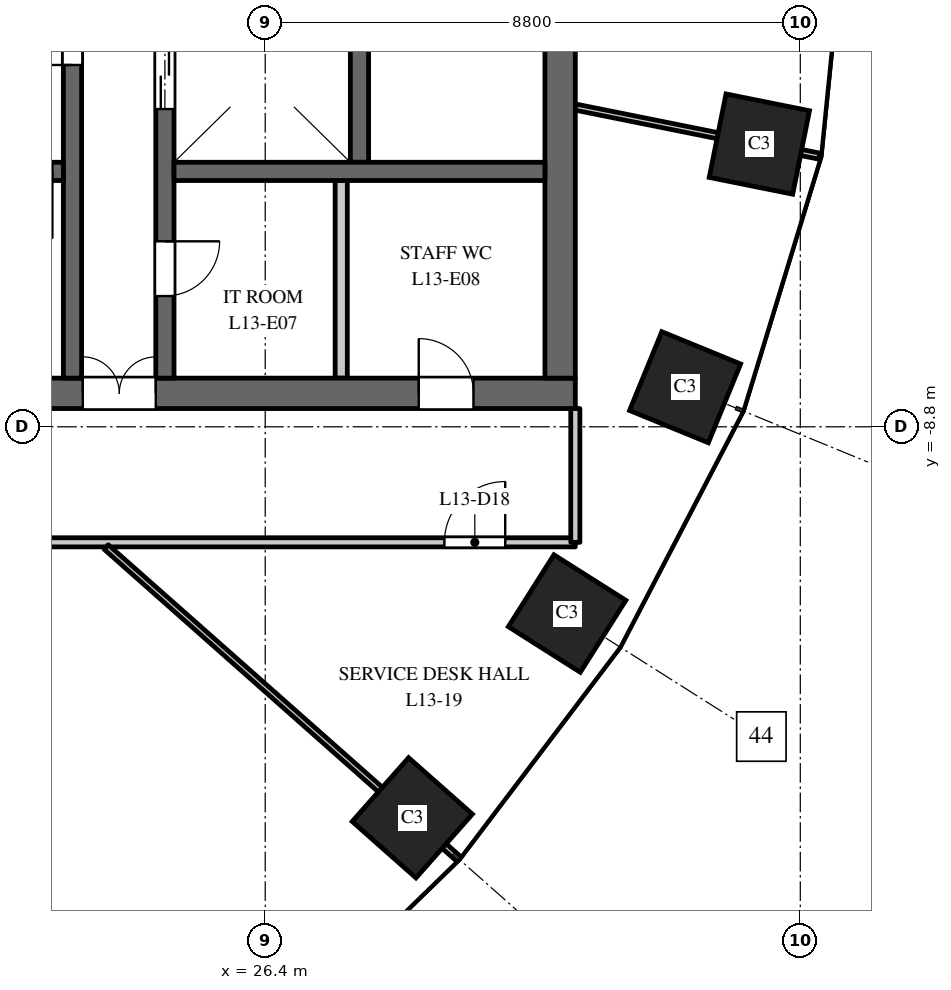
"""IFC4 building model, lengths in metres.
Left out: names, types, materials, properties, quantities, classifications, styles, units other than length and angle.
Written with IfcOpenShell. Run it as: python <this file> out.ifc"""

import sys

from ifc_helpers import new_model, si_unit, direction, frame, frame_2d, origin, origin_2d, place, context, subcontext, project, spatial, rectangle, extrude, element, fill, save


model = new_model("IFC4")
c1 = context("Model", 3, precision=1e-05, world=origin(), true_north=direction((0.0, 1.0)))
c2 = subcontext(c1, "Body", "Model", "MODEL_VIEW")
j1 = project(units=[si_unit("LENGTHUNIT", "METRE"), si_unit("PLANEANGLEUNIT", "RADIAN")], contexts=[c1])
p1 = place(None, origin())
s1 = spatial("IfcSite", under=j1, at=p1, CompositionType="ELEMENT")
p2 = place(p1, origin())
s2 = spatial("IfcBuilding", under=s1, at=p2, CompositionType="ELEMENT")
p3 = place(p2, frame((0.0, 0.0, 62.5)))
s3 = spatial("IfcBuildingStorey", under=s2, at=p3, CompositionType="ELEMENT", Elevation=62.5)
for number, where, z_axis, x_axis in (
    (1, (28.819, -15.23, 0.0), (0.0, 0.0, 1.0), (0.663, 0.749, 0.0)),
    (2, (31.365, -11.871, 0.0), (0.0, 0.0, 1.0), (0.535, 0.845, 0.0)),
    (3, (33.305, -8.149, 0.0), (0.0, 0.0, 1.0), (0.379, 0.925, 0.0)),
    (4, (34.527, -4.151, 0.0), (0.0, 0.0, 1.0), (0.197, 0.98, 0.0)),
):
    element("IfcColumn", number, at=place(p3, frame(where, z_axis=z_axis, x_axis=x_axis)), inside=s3, PredefinedType="COLUMN", context=c2, shape_type="SweptSolid", body=[
        extrude(rectangle(XDim=1.4, YDim=1.4, at=origin_2d()), origin(), (0.0, 0.0, 1.0), 4.0),
    ])
p4 = place(p3, frame((16.5, -8.25, 0.0), z_axis=(0.0, 0.0, 1.0), x_axis=(1.0, 0.0, 0.0)))
e5 = element("IfcWall", 5, at=p4, inside=s3, PredefinedType="SHEAR", context=c2, shape_type="SweptSolid", body=[
    extrude(rectangle(XDim=15.0, YDim=0.5, at=frame_2d((7.5, 0.0))), origin(), (0.0, 0.0, 1.0), 3.7),
])
p5 = place(p4, frame((6.9, 0.0, 0.0)))
e6 = element("IfcOpeningElement", 6, at=p5, cuts=e5, PredefinedType="OPENING", context=c2, shape_type="SweptSolid", body=[
    extrude(rectangle(XDim=1.2, YDim=2.1, at=frame_2d((0.6, 1.05))), frame((0.0, 0.26, 0.0), z_axis=(0.0, -1.0, 0.0), x_axis=(1.0, 0.0, 0.0)), (0.0, 0.0, 1.0), 0.52),
])
p6 = place(p4, frame((12.425, 0.0, 0.0)))
e7 = element("IfcOpeningElement", 7, at=p6, cuts=e5, PredefinedType="OPENING", context=c2, shape_type="SweptSolid", body=[
    extrude(rectangle(XDim=0.9, YDim=2.1, at=frame_2d((0.45, 1.05))), frame((0.0, 0.26, 0.0), z_axis=(0.0, -1.0, 0.0), x_axis=(1.0, 0.0, 0.0)), (0.0, 0.0, 1.0), 0.52),
])
p7 = place(p3, frame((27.95, -4.45, 0.0), z_axis=(0.0, 0.0, 1.0), x_axis=(0.0, 1.0, 0.0)))
e8 = element("IfcWall", 8, at=p7, inside=s3, PredefinedType="SHEAR", context=c2, shape_type="SweptSolid", body=[
    extrude(rectangle(XDim=8.9, YDim=0.3, at=frame_2d((4.45, 0.0))), origin(), (0.0, 0.0, 1.0), 3.7),
])
p8 = place(p3, frame((24.75, -8.0, 0.0), z_axis=(0.0, 0.0, 1.0), x_axis=(0.0, 1.0, 0.0)))
e9 = element("IfcWall", 9, at=p8, inside=s3, PredefinedType="SHEAR", context=c2, shape_type="SweptSolid", body=[
    extrude(rectangle(XDim=16.0, YDim=0.3, at=frame_2d((8.0, 0.0))), origin(), (0.0, 0.0, 1.0), 3.7),
])
p9 = place(p8, frame((4.425, 0.0, 0.0)))
e10 = element("IfcOpeningElement", 10, at=p9, cuts=e9, PredefinedType="OPENING", context=c2, shape_type="SweptSolid", body=[
    extrude(rectangle(XDim=1.1, YDim=2.1, at=frame_2d((0.55, 1.05))), frame((0.0, 0.16, 0.0), z_axis=(0.0, -1.0, 0.0), x_axis=(1.0, 0.0, 0.0)), (0.0, 0.0, 1.0), 0.32),
])
p10 = place(p8, frame((7.45, 0.0, 0.0)))
e11 = element("IfcOpeningElement", 11, at=p10, cuts=e9, PredefinedType="OPENING", context=c2, shape_type="SweptSolid", body=[
    extrude(rectangle(XDim=1.1, YDim=2.1, at=frame_2d((0.55, 1.05))), frame((0.0, 0.16, 0.0), z_axis=(0.0, -1.0, 0.0), x_axis=(1.0, 0.0, 0.0)), (0.0, 0.0, 1.0), 0.32),
])
p11 = place(p8, frame((10.425, 0.0, 0.0)))
e12 = element("IfcOpeningElement", 12, at=p11, cuts=e9, PredefinedType="OPENING", context=c2, shape_type="SweptSolid", body=[
    extrude(rectangle(XDim=1.2, YDim=2.1, at=frame_2d((0.6, 1.05))), frame((0.0, 0.16, 0.0), z_axis=(0.0, -1.0, 0.0), x_axis=(1.0, 0.0, 0.0)), (0.0, 0.0, 1.0), 0.32),
])
p12 = place(p8, frame((13.75, 0.0, 0.0)))
e13 = element("IfcOpeningElement", 13, at=p12, cuts=e9, PredefinedType="OPENING", context=c2, shape_type="SweptSolid", body=[
    extrude(rectangle(XDim=0.9, YDim=2.1, at=frame_2d((0.45, 1.05))), frame((0.0, 0.16, 0.0), z_axis=(0.0, -1.0, 0.0), x_axis=(1.0, 0.0, 0.0)), (0.0, 0.0, 1.0), 0.32),
])
p13 = place(p8, frame((1.35, 0.0, 0.0)))
e14 = element("IfcOpeningElement", 14, at=p13, cuts=e9, PredefinedType="OPENING", context=c2, shape_type="SweptSolid", body=[
    extrude(rectangle(XDim=0.9, YDim=2.1, at=frame_2d((0.45, 1.05))), frame((0.0, 0.16, 0.0), z_axis=(0.0, -1.0, 0.0), x_axis=(1.0, 0.0, 0.0)), (0.0, 0.0, 1.0), 0.32),
])
p14 = place(p3, frame((31.25, -8.0, 0.0), z_axis=(0.0, 0.0, 1.0), x_axis=(0.0, 1.0, 0.0)))
e15 = element("IfcWall", 15, at=p14, inside=s3, PredefinedType="SHEAR", context=c2, shape_type="SweptSolid", body=[
    extrude(rectangle(XDim=16.0, YDim=0.5, at=frame_2d((8.0, 0.0))), origin(), (0.0, 0.0, 1.0), 3.7),
])
p15 = place(p3, frame((27.65, -8.0, 0.0), z_axis=(0.0, 0.0, 1.0), x_axis=(0.0, 1.0, 0.0)))
e16 = element("IfcWall", 16, at=p15, inside=s3, PredefinedType="PARTITIONING", context=c2, shape_type="SweptSolid", body=[
    extrude(rectangle(XDim=3.25, YDim=0.2, at=frame_2d((1.625, 0.0))), origin(), (0.0, 0.0, 1.0), 3.7),
])
p16 = place(p3, frame((24.9, -4.6, 0.0), z_axis=(0.0, 0.0, 1.0), x_axis=(1.0, 0.0, 0.0)))
e17 = element("IfcWall", 17, at=p16, inside=s3, PredefinedType="SHEAR", context=c2, shape_type="SweptSolid", body=[
    extrude(rectangle(XDim=6.1, YDim=0.3, at=frame_2d((3.05, 0.0))), origin(), (0.0, 0.0, 1.0), 3.7),
])
p17 = place(p3, frame((23.23, -8.0, 0.0), z_axis=(0.0, 0.0, 1.0), x_axis=(0.0, 1.0, 0.0)))
e18 = element("IfcWall", 18, at=p17, inside=s3, PredefinedType="SHEAR", context=c2, shape_type="SweptSolid", body=[
    extrude(rectangle(XDim=7.875, YDim=0.3, at=frame_2d((3.938, 0.0))), origin(), (0.0, 0.0, 1.0), 3.7),
])
p18 = place(p17, frame((5.15, 0.0, 0.0)))
e19 = element("IfcOpeningElement", 19, at=p18, cuts=e18, PredefinedType="OPENING", context=c2, shape_type="SweptSolid", body=[
    extrude(rectangle(XDim=1.1, YDim=2.1, at=frame_2d((0.55, 1.05))), frame((0.0, 0.16, 0.0), z_axis=(0.0, -1.0, 0.0), x_axis=(1.0, 0.0, 0.0)), (0.0, 0.0, 1.0), 0.32),
])
p19 = place(p3, frame((16.9, -4.6, 0.0), z_axis=(0.0, 0.0, 1.0), x_axis=(1.0, 0.0, 0.0)))
e20 = element("IfcWall", 20, at=p19, inside=s3, PredefinedType="SHEAR", context=c2, shape_type="SweptSolid", body=[
    extrude(rectangle(XDim=6.18, YDim=0.3, at=frame_2d((3.09, 0.0))), origin(), (0.0, 0.0, 1.0), 3.7),
])
p20 = place(p19, frame((4.9, 0.0, 0.0)))
e21 = element("IfcOpeningElement", 21, at=p20, cuts=e20, PredefinedType="OPENING", context=c2, shape_type="SweptSolid", body=[
    extrude(rectangle(XDim=1.1, YDim=2.1, at=frame_2d((0.55, 1.05))), frame((0.0, 0.16, 0.0), z_axis=(0.0, -1.0, 0.0), x_axis=(1.0, 0.0, 0.0)), (0.0, 0.0, 1.0), 0.32),
])
p21 = place(p3, frame((16.5, -10.7, 0.0), z_axis=(0.0, 0.0, 1.0), x_axis=(1.0, 0.0, 0.0)))
e22 = element("IfcWall", 22, at=p21, inside=s3, PredefinedType="PARTITIONING", context=c2, shape_type="SweptSolid", body=[
    extrude(rectangle(XDim=15.0, YDim=0.15, at=frame_2d((7.5, 0.0))), origin(), (0.0, 0.0, 1.0), 2.75),
])
p22 = place(p21, frame((12.847, 0.0, 0.0)))
e23 = element("IfcOpeningElement", 23, at=p22, cuts=e22, PredefinedType="OPENING", context=c2, shape_type="SweptSolid", body=[
    extrude(rectangle(XDim=1.0, YDim=2.1, at=frame_2d((0.5, 1.05))), frame((0.0, 0.085, 0.0), z_axis=(0.0, -1.0, 0.0), x_axis=(1.0, 0.0, 0.0)), (0.0, 0.0, 1.0), 0.17),
])
p23 = place(p3, frame((23.785, -10.778, 0.0), z_axis=(0.0, 0.0, 1.0), x_axis=(0.748985701008, -0.662586160198, 0.0)))
e24 = element("IfcWall", 24, at=p23, inside=s3, PredefinedType="PARTITIONING", context=c2, shape_type="SweptSolid", body=[
    extrude(rectangle(XDim=7.723, YDim=0.1, at=frame_2d((3.861, 0.0))), origin(), (0.0, 0.0, 1.0), 3.7),
])
p24 = place(p3, frame((31.5, -10.7, 0.0), z_axis=(0.0, 0.0, 1.0), x_axis=(0.0, 1.0, 0.0)))
e25 = element("IfcWall", 25, at=p24, inside=s3, PredefinedType="PARTITIONING", context=c2, shape_type="SweptSolid", body=[
    extrude(rectangle(XDim=2.2, YDim=0.15, at=frame_2d((1.1, 0.0))), origin(), (0.0, 0.0, 1.0), 2.85),
])
p25 = place(p3, frame((31.5, -3.542, 0.0), z_axis=(0.0, 0.0, 1.0), x_axis=(0.980357474535, -0.197228857227, 0.0)))
e26 = element("IfcWall", 26, at=p25, inside=s3, PredefinedType="PARTITIONING", context=c2, shape_type="SweptSolid", body=[
    extrude(rectangle(XDim=4.092, YDim=0.1, at=frame_2d((2.046, 0.0))), origin(), (0.0, 0.0, 1.0), 2.85),
])
p26 = place(p9, origin())
e27 = element("IfcDoor", 27, at=p26, inside=s3, OperationType="DOUBLE_DOOR_SLIDING", PredefinedType="DOOR", context=c2, shape_type="SweptSolid", body=[
    extrude(rectangle(XDim=1.1, YDim=2.1, at=frame_2d((0.55, 1.05))), frame((0.0, 0.025, 0.0), z_axis=(0.0, -1.0, 0.0), x_axis=(1.0, 0.0, 0.0)), (0.0, 0.0, 1.0), 0.05),
])
fill(e10, e27)
p27 = place(p20, origin())
e28 = element("IfcDoor", 28, at=p27, inside=s3, OperationType="SINGLE_SWING_RIGHT", PredefinedType="DOOR", context=c2, shape_type="SweptSolid", body=[
    extrude(rectangle(XDim=1.1, YDim=2.1, at=frame_2d((0.55, 1.05))), frame((0.0, 0.025, 0.0), z_axis=(0.0, -1.0, 0.0), x_axis=(1.0, 0.0, 0.0)), (0.0, 0.0, 1.0), 0.05),
])
fill(e21, e28)
p28 = place(p18, origin())
e29 = element("IfcDoor", 29, at=p28, inside=s3, OperationType="SINGLE_SWING_RIGHT", PredefinedType="DOOR", context=c2, shape_type="SweptSolid", body=[
    extrude(rectangle(XDim=1.1, YDim=2.1, at=frame_2d((0.55, 1.05))), frame((0.0, 0.025, 0.0), z_axis=(0.0, -1.0, 0.0), x_axis=(1.0, 0.0, 0.0)), (0.0, 0.0, 1.0), 0.05),
])
fill(e19, e29)
p29 = place(p5, origin())
e30 = element("IfcDoor", 30, at=p29, inside=s3, OperationType="DOUBLE_DOOR_DOUBLE_SWING", PredefinedType="DOOR", context=c2, shape_type="SweptSolid", body=[
    extrude(rectangle(XDim=1.2, YDim=2.1, at=frame_2d((0.6, 1.05))), frame((0.0, 0.025, 0.0), z_axis=(0.0, -1.0, 0.0), x_axis=(1.0, 0.0, 0.0)), (0.0, 0.0, 1.0), 0.05),
])
fill(e6, e30)
p30 = place(p13, origin())
e31 = element("IfcDoor", 31, at=p30, inside=s3, OperationType="SINGLE_SWING_RIGHT", PredefinedType="DOOR", context=c2, shape_type="SweptSolid", body=[
    extrude(rectangle(XDim=0.9, YDim=2.1, at=frame_2d((0.45, 1.05))), frame((0.0, 0.025, 0.0), z_axis=(0.0, -1.0, 0.0), x_axis=(1.0, 0.0, 0.0)), (0.0, 0.0, 1.0), 0.05),
])
fill(e14, e31)
p31 = place(p6, origin())
e32 = element("IfcDoor", 32, at=p31, inside=s3, OperationType="SINGLE_SWING_RIGHT", PredefinedType="DOOR", context=c2, shape_type="SweptSolid", body=[
    extrude(rectangle(XDim=0.9, YDim=2.1, at=frame_2d((0.45, 1.05))), frame((0.0, 0.025, 0.0), z_axis=(0.0, -1.0, 0.0), x_axis=(1.0, 0.0, 0.0)), (0.0, 0.0, 1.0), 0.05),
])
fill(e7, e32)
p32 = place(p22, origin())
e33 = element("IfcDoor", 33, at=p32, inside=s3, OperationType="SINGLE_SWING_RIGHT", PredefinedType="DOOR", context=c2, shape_type="SweptSolid", body=[
    extrude(rectangle(XDim=1.0, YDim=2.1, at=frame_2d((0.5, 1.05))), frame((0.0, 0.025, 0.0), z_axis=(0.0, -1.0, 0.0), x_axis=(1.0, 0.0, 0.0)), (0.0, 0.0, 1.0), 0.05),
])
fill(e23, e33)
save(model, sys.argv[1])
